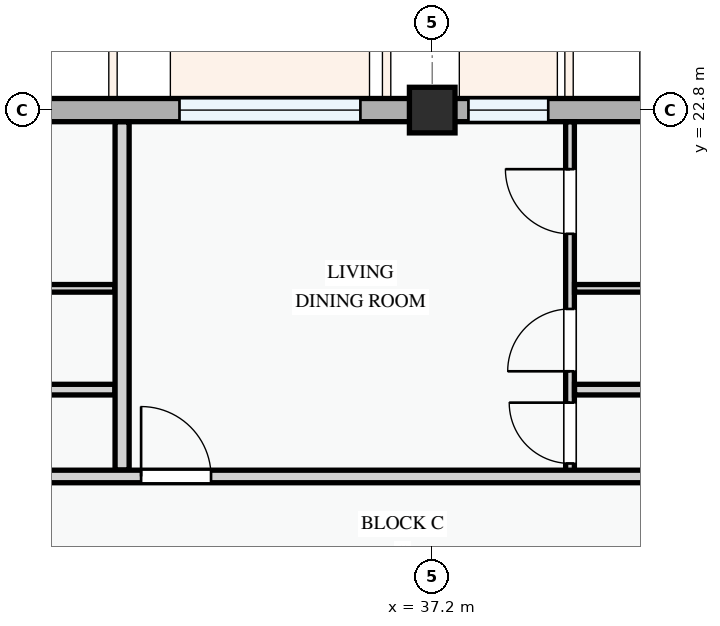
"""IFC4 building model, lengths in metres.
Left out: names, types, materials, properties, quantities, classifications, styles, units other than length and angle.
Written with IfcOpenShell. Run it as: python <this file> out.ifc"""

import sys

from ifc_helpers import new_model, si_unit, direction, frame, frame_2d, origin, origin_2d, place, context, subcontext, project, spatial, rectangle, extrude, element, fill, save


model = new_model("IFC4")
c1 = context("Model", 3, precision=1e-05, world=origin(), true_north=direction((0.0, 1.0)))
c2 = subcontext(c1, "Body", "Model", "MODEL_VIEW")
j1 = project(units=[si_unit("LENGTHUNIT", "METRE"), si_unit("PLANEANGLEUNIT", "RADIAN")], contexts=[c1])
p1 = place(None, origin())
s1 = spatial("IfcSite", under=j1, at=p1, CompositionType="ELEMENT")
p2 = place(p1, origin())
s2 = spatial("IfcBuilding", under=s1, at=p2, CompositionType="ELEMENT")
p3 = place(p2, frame((0.0, 0.0, 18.0)))
s3 = spatial("IfcBuildingStorey", under=s2, at=p3, CompositionType="ELEMENT", Elevation=18.0)
p4 = place(p3, frame((37.2, 22.8, 0.0), z_axis=(0.0, 0.0, 1.0), x_axis=(1.0, 0.0, 0.0)))
e1 = element("IfcColumn", 1, at=p4, inside=s3, PredefinedType="COLUMN", context=c2, shape_type="SweptSolid", body=[
    extrude(rectangle(XDim=0.6, YDim=0.6, at=origin_2d()), origin(), (0.0, 0.0, 1.0), 3.3),
])
p5 = place(p3, frame((43.2, 22.8, 0.0), z_axis=(0.0, 0.0, 1.0), x_axis=(-1.0, 0.0, 0.0)))
e2 = element("IfcWall", 2, at=p5, inside=s3, PredefinedType="STANDARD", context=c2, shape_type="SweptSolid", body=[
    extrude(rectangle(XDim=6.0, YDim=0.305, at=frame_2d((3.0, 0.0))), origin(), (0.0, 0.0, 1.0), 2.475),
])
p6 = place(p5, frame((1.229, 0.0, 0.78)))
e3 = element("IfcOpeningElement", 3, at=p6, cuts=e2, PredefinedType="OPENING", context=c2, shape_type="SweptSolid", body=[
    extrude(rectangle(XDim=1.92, YDim=1.44, at=frame_2d((0.96, 0.72))), frame((0.0, 0.163, 0.0), z_axis=(0.0, -1.0, 0.0), x_axis=(1.0, 0.0, 0.0)), (0.0, 0.0, 1.0), 0.325),
])
p7 = place(p5, frame((4.474, 0.0, 0.78)))
e4 = element("IfcOpeningElement", 4, at=p7, cuts=e2, PredefinedType="OPENING", context=c2, shape_type="SweptSolid", body=[
    extrude(rectangle(XDim=1.05, YDim=1.2, at=frame_2d((0.525, 0.6))), frame((0.0, 0.163, 0.0), z_axis=(0.0, -1.0, 0.0), x_axis=(1.0, 0.0, 0.0)), (0.0, 0.0, 1.0), 0.325),
])
p8 = place(p3, frame((37.2, 22.8, 0.0), z_axis=(0.0, 0.0, 1.0), x_axis=(-1.0, 0.0, 0.0)))
e5 = element("IfcWall", 5, at=p8, inside=s3, PredefinedType="STANDARD", context=c2, shape_type="SweptSolid", body=[
    extrude(rectangle(XDim=8.4, YDim=0.305, at=frame_2d((4.2, 0.0))), origin(), (0.0, 0.0, 1.0), 2.375),
])
p9 = place(p8, frame((0.945, 0.0, 0.78)))
e6 = element("IfcOpeningElement", 6, at=p9, cuts=e5, PredefinedType="OPENING", context=c2, shape_type="SweptSolid", body=[
    extrude(rectangle(XDim=2.38, YDim=1.48, at=frame_2d((1.19, 0.74))), frame((0.0, 0.163, 0.0), z_axis=(0.0, -1.0, 0.0), x_axis=(1.0, 0.0, 0.0)), (0.0, 0.0, 1.0), 0.325),
])
p10 = place(p8, frame((5.595, 0.0, 0.78)))
e7 = element("IfcOpeningElement", 7, at=p10, cuts=e5, PredefinedType="OPENING", context=c2, shape_type="SweptSolid", body=[
    extrude(rectangle(XDim=1.1, YDim=1.3, at=frame_2d((0.55, 0.65))), frame((0.0, 0.163, 0.0), z_axis=(0.0, -1.0, 0.0), x_axis=(1.0, 0.0, 0.0)), (0.0, 0.0, 1.0), 0.325),
])
p11 = place(p3, frame((27.04, 20.455, 0.0), z_axis=(0.0, 0.0, 1.0), x_axis=(1.0, 0.0, 0.0)))
e8 = element("IfcWall", 8, at=p11, inside=s3, PredefinedType="PARTITIONING", context=c2, shape_type="SweptSolid", body=[
    extrude(rectangle(XDim=5.985, YDim=0.1, at=frame_2d((2.993, 0.0))), origin(), (0.0, 0.0, 1.0), 3.0),
])
p12 = place(p3, frame((27.04, 19.122, 0.0), z_axis=(0.0, 0.0, 1.0), x_axis=(1.0, 0.0, 0.0)))
e9 = element("IfcWall", 9, at=p12, inside=s3, PredefinedType="PARTITIONING", context=c2, shape_type="SweptSolid", body=[
    extrude(rectangle(XDim=5.985, YDim=0.14, at=frame_2d((2.993, 0.0))), origin(), (0.0, 0.0, 1.0), 3.0),
])
p13 = place(p3, frame((39.013, 17.98, 0.0), z_axis=(0.0, 0.0, 1.0), x_axis=(0.0, 1.0, 0.0)))
e10 = element("IfcWall", 10, at=p13, inside=s3, PredefinedType="PARTITIONING", context=c2, shape_type="SweptSolid", body=[
    extrude(rectangle(XDim=4.666, YDim=0.115, at=frame_2d((2.333, 0.0))), origin(), (0.0, 0.0, 1.0), 3.0),
])
p14 = place(p13, frame((0.171, 0.0, 0.0)))
e11 = element("IfcOpeningElement", 11, at=p14, cuts=e10, PredefinedType="OPENING", context=c2, shape_type="SweptSolid", body=[
    extrude(rectangle(XDim=0.8, YDim=2.1, at=frame_2d((0.4, 1.05))), frame((0.0, 0.067, 0.0), z_axis=(0.0, -1.0, 0.0), x_axis=(1.0, 0.0, 0.0)), (0.0, 0.0, 1.0), 0.135),
])
p15 = place(p13, frame((1.384, 0.0, 0.0)))
e12 = element("IfcOpeningElement", 12, at=p15, cuts=e10, PredefinedType="OPENING", context=c2, shape_type="SweptSolid", body=[
    extrude(rectangle(XDim=0.82, YDim=2.08, at=frame_2d((0.41, 1.04))), frame((0.0, 0.067, 0.0), z_axis=(0.0, -1.0, 0.0), x_axis=(1.0, 0.0, 0.0)), (0.0, 0.0, 1.0), 0.135),
])
p16 = place(p13, frame((3.193, 0.0, 0.0)))
e13 = element("IfcOpeningElement", 13, at=p16, cuts=e10, PredefinedType="OPENING", context=c2, shape_type="SweptSolid", body=[
    extrude(rectangle(XDim=0.85, YDim=2.1, at=frame_2d((0.425, 1.05))), frame((0.0, 0.067, 0.0), z_axis=(0.0, -1.0, 0.0), x_axis=(1.0, 0.0, 0.0)), (0.0, 0.0, 1.0), 0.135),
])
p17 = place(p3, frame((39.072, 20.455, 0.0), z_axis=(0.0, 0.0, 1.0), x_axis=(1.0, 0.0, 0.0)))
e14 = element("IfcWall", 14, at=p17, inside=s3, PredefinedType="PARTITIONING", context=c2, shape_type="SweptSolid", body=[
    extrude(rectangle(XDim=5.796, YDim=0.1, at=frame_2d((2.898, 0.0))), origin(), (0.0, 0.0, 1.0), 3.0),
])
p18 = place(p3, frame((39.072, 19.122, 0.0), z_axis=(0.0, 0.0, 1.0), x_axis=(1.0, 0.0, 0.0)))
e15 = element("IfcWall", 15, at=p18, inside=s3, PredefinedType="PARTITIONING", context=c2, shape_type="SweptSolid", body=[
    extrude(rectangle(XDim=5.796, YDim=0.14, at=frame_2d((2.898, 0.0))), origin(), (0.0, 0.0, 1.0), 3.0),
])
p19 = place(p3, frame((33.12, 18.064, 0.0), z_axis=(0.0, 0.0, 1.0), x_axis=(0.0, 1.0, 0.0)))
e16 = element("IfcWall", 16, at=p19, inside=s3, PredefinedType="PARTITIONING", context=c2, shape_type="SweptSolid", body=[
    extrude(rectangle(XDim=4.581, YDim=0.185, at=frame_2d((2.291, 0.0))), origin(), (0.0, 0.0, 1.0), 2.585),
])
p20 = place(p3, frame((22.66, 17.98, 0.0), z_axis=(0.0, 0.0, 1.0), x_axis=(1.0, 0.0, 0.0)))
e17 = element("IfcWall", 17, at=p20, inside=s3, PredefinedType="PARTITIONING", context=c2, shape_type="SweptSolid", body=[
    extrude(rectangle(XDim=34.88, YDim=0.165, at=frame_2d((17.44, 0.0))), origin(), (0.0, 0.0, 1.0), 3.0),
])
p21 = place(p20, frame((2.664, 0.0, 0.0)))
e18 = element("IfcOpeningElement", 18, at=p21, cuts=e17, PredefinedType="OPENING", context=c2, shape_type="SweptSolid", body=[
    extrude(rectangle(XDim=0.92, YDim=2.1, at=frame_2d((0.46, 1.05))), frame((0.0, 0.093, 0.0), z_axis=(0.0, -1.0, 0.0), x_axis=(1.0, 0.0, 0.0)), (0.0, 0.0, 1.0), 0.185),
])
p22 = place(p20, frame((10.71, 0.0, 0.0)))
e19 = element("IfcOpeningElement", 19, at=p22, cuts=e17, PredefinedType="OPENING", context=c2, shape_type="SweptSolid", body=[
    extrude(rectangle(XDim=0.92, YDim=2.1, at=frame_2d((0.46, 1.05))), frame((0.0, 0.093, 0.0), z_axis=(0.0, -1.0, 0.0), x_axis=(1.0, 0.0, 0.0)), (0.0, 0.0, 1.0), 0.185),
])
p23 = place(p20, frame((24.254, 0.0, 0.0)))
e20 = element("IfcOpeningElement", 20, at=p23, cuts=e17, PredefinedType="OPENING", context=c2, shape_type="SweptSolid", body=[
    extrude(rectangle(XDim=0.92, YDim=2.1, at=frame_2d((0.46, 1.05))), frame((0.0, 0.093, 0.0), z_axis=(0.0, -1.0, 0.0), x_axis=(1.0, 0.0, 0.0)), (0.0, 0.0, 1.0), 0.185),
])
p24 = place(p7, origin())
e21 = element("IfcWindow", 21, at=p24, inside=s3, PartitioningType="SINGLE_PANEL", PredefinedType="WINDOW", context=c2, shape_type="SweptSolid", body=[
    extrude(rectangle(XDim=1.05, YDim=1.2, at=frame_2d((0.525, 0.6))), frame((0.0, 0.03, 0.0), z_axis=(0.0, -1.0, 0.0), x_axis=(1.0, 0.0, 0.0)), (0.0, 0.0, 1.0), 0.06),
])
fill(e4, e21)
p25 = place(p9, origin())
e22 = element("IfcWindow", 22, at=p25, inside=s3, PartitioningType="DOUBLE_PANEL_VERTICAL", PredefinedType="WINDOW", context=c2, shape_type="SweptSolid", body=[
    extrude(rectangle(XDim=2.38, YDim=1.48, at=frame_2d((1.19, 0.74))), frame((0.0, 0.03, 0.0), z_axis=(0.0, -1.0, 0.0), x_axis=(1.0, 0.0, 0.0)), (0.0, 0.0, 1.0), 0.06),
])
fill(e6, e22)
p26 = place(p14, origin())
e23 = element("IfcDoor", 23, at=p26, inside=s3, OperationType="SINGLE_SWING_RIGHT", PredefinedType="DOOR", context=c2, shape_type="SweptSolid", body=[
    extrude(rectangle(XDim=0.8, YDim=2.1, at=frame_2d((0.4, 1.05))), frame((0.0, 0.025, 0.0), z_axis=(0.0, -1.0, 0.0), x_axis=(1.0, 0.0, 0.0)), (0.0, 0.0, 1.0), 0.05),
])
fill(e11, e23)
p27 = place(p15, origin())
e24 = element("IfcDoor", 24, at=p27, inside=s3, OperationType="SINGLE_SWING_LEFT", PredefinedType="DOOR", context=c2, shape_type="SweptSolid", body=[
    extrude(rectangle(XDim=0.82, YDim=2.08, at=frame_2d((0.41, 1.04))), frame((0.0, 0.025, 0.0), z_axis=(0.0, -1.0, 0.0), x_axis=(1.0, 0.0, 0.0)), (0.0, 0.0, 1.0), 0.05),
])
fill(e12, e24)
p28 = place(p16, origin())
e25 = element("IfcDoor", 25, at=p28, inside=s3, OperationType="SINGLE_SWING_RIGHT", PredefinedType="DOOR", context=c2, shape_type="SweptSolid", body=[
    extrude(rectangle(XDim=0.85, YDim=2.1, at=frame_2d((0.425, 1.05))), frame((0.0, 0.025, 0.0), z_axis=(0.0, -1.0, 0.0), x_axis=(1.0, 0.0, 0.0)), (0.0, 0.0, 1.0), 0.05),
])
fill(e13, e25)
p29 = place(p22, origin())
e26 = element("IfcDoor", 26, at=p29, inside=s3, OperationType="SINGLE_SWING_LEFT", PredefinedType="DOOR", context=c2, shape_type="SweptSolid", body=[
    extrude(rectangle(XDim=0.92, YDim=2.1, at=frame_2d((0.46, 1.05))), frame((0.0, 0.025, 0.0), z_axis=(0.0, -1.0, 0.0), x_axis=(1.0, 0.0, 0.0)), (0.0, 0.0, 1.0), 0.05),
])
fill(e19, e26)
save(model, sys.argv[1])
